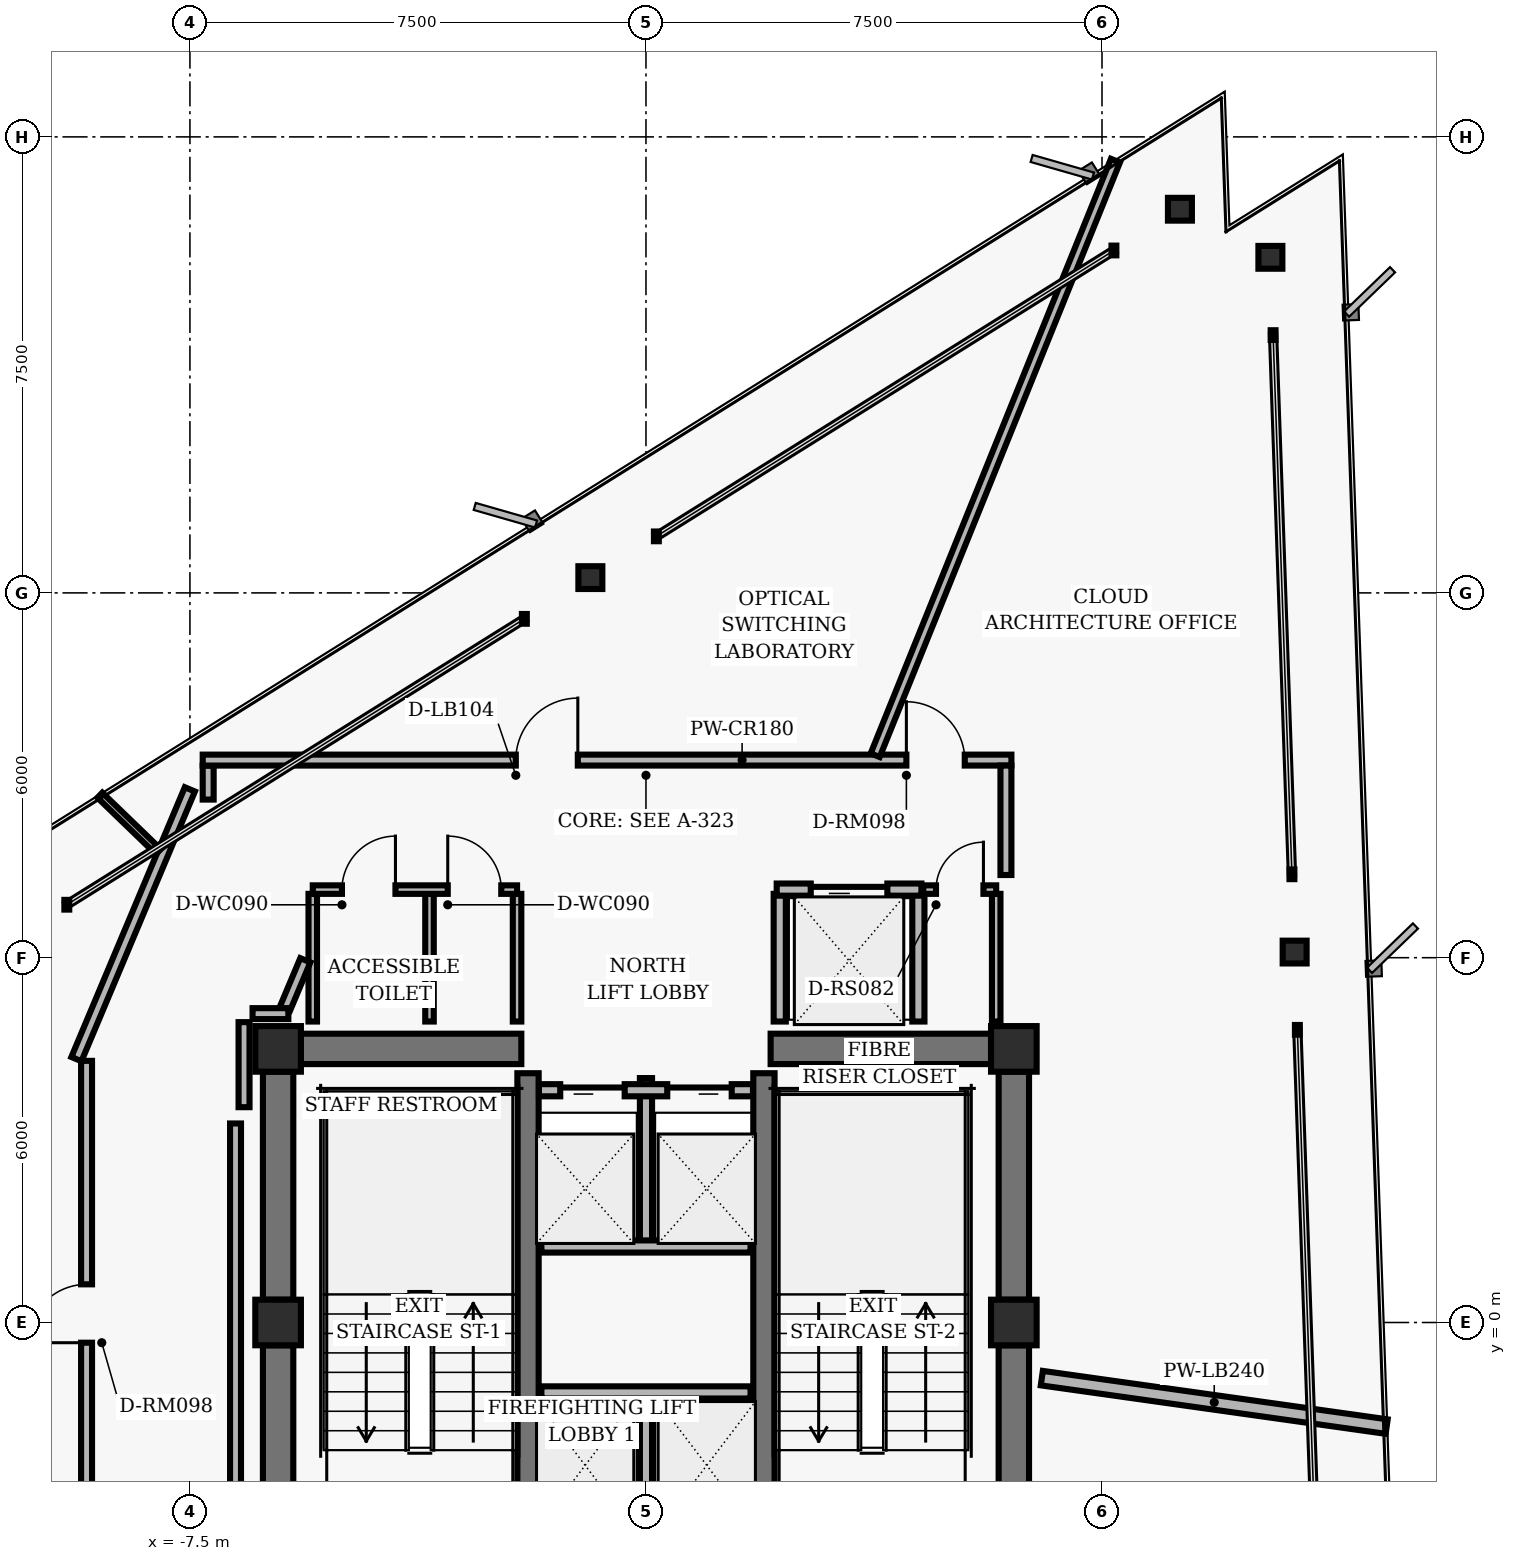
"""IFC4 building model, lengths in metres.
Left out: names, types, materials, properties, quantities, classifications, styles, units other than length and angle.
Written with IfcOpenShell. Run it as: python <this file> out.ifc"""

import sys

from ifc_helpers import new_model, si_unit, direction, frame, frame_2d, origin, origin_2d, place, context, subcontext, project, spatial, rectangle, hollow_rectangle, i_section, extrude, element, fill, save


model = new_model("IFC4")
c1 = context("Model", 3, precision=1e-05, world=origin(), true_north=direction((0.0, 1.0)))
c2 = subcontext(c1, "Body", "Model", "MODEL_VIEW")
j1 = project(units=[si_unit("LENGTHUNIT", "METRE"), si_unit("PLANEANGLEUNIT", "RADIAN")], contexts=[c1])
p1 = place(None, origin())
s1 = spatial("IfcSite", under=j1, at=p1, CompositionType="ELEMENT")
p2 = place(p1, origin())
s2 = spatial("IfcBuilding", under=s1, at=p2, CompositionType="ELEMENT")
p3 = place(p2, frame((0.0, 0.0, 205.76)))
s3 = spatial("IfcBuildingStorey", under=s2, at=p3, CompositionType="ELEMENT", Elevation=205.76)
for number, where, z_axis, x_axis in (
    (1, (-6.05, 4.5, 0.0), (0.0, 0.0, 1.0), (1.0, 0.0, 0.0)),
    (2, (6.05, 4.5, 0.0), (0.0, 0.0, 1.0), (1.0, 0.0, 0.0)),
    (3, (-6.05, 0.0, 0.0), (0.0, 0.0, 1.0), (1.0, 0.0, 0.0)),
    (4, (6.05, 0.0, 0.0), (0.0, 0.0, 1.0), (1.0, 0.0, 0.0)),
):
    element("IfcColumn", number, at=place(p3, frame(where, z_axis=z_axis, x_axis=x_axis)), inside=s3, PredefinedType="COLUMN", context=c2, shape_type="SweptSolid", body=[
        extrude(hollow_rectangle(XDim=0.75, YDim=0.75, WallThickness=0.05, InnerFilletRadius=0.02, OuterFilletRadius=0.04, at=origin_2d()), origin(), (0.0, 0.0, 1.0), 3.04),
    ])
p4 = place(p3, frame((-6.05, 0.375, 0.0), z_axis=(0.0, 0.0, 1.0), x_axis=(0.0, 1.0, 0.0)))
e5 = element("IfcWall", 5, at=p4, inside=s3, PredefinedType="SHEAR", context=c2, shape_type="SweptSolid", body=[
    extrude(rectangle(XDim=3.75, YDim=0.5, at=frame_2d((1.875, 0.0))), origin(), (0.0, 0.0, 1.0), 2.798),
])
p5 = place(p3, frame((-6.05, -3.925, 0.0), z_axis=(0.0, 0.0, 1.0), x_axis=(0.0, 1.0, 0.0)))
e6 = element("IfcWall", 6, at=p5, inside=s3, PredefinedType="SHEAR", context=c2, shape_type="SweptSolid", body=[
    extrude(rectangle(XDim=3.55, YDim=0.5, at=frame_2d((1.775, 0.0))), origin(), (0.0, 0.0, 1.0), 2.798),
])
p6 = place(p3, frame((6.05, 0.375, 0.0), z_axis=(0.0, 0.0, 1.0), x_axis=(0.0, 1.0, 0.0)))
e7 = element("IfcWall", 7, at=p6, inside=s3, PredefinedType="SHEAR", context=c2, shape_type="SweptSolid", body=[
    extrude(rectangle(XDim=3.75, YDim=0.5, at=frame_2d((1.875, 0.0))), origin(), (0.0, 0.0, 1.0), 2.798),
])
p7 = place(p3, frame((6.05, -3.925, 0.0), z_axis=(0.0, 0.0, 1.0), x_axis=(0.0, 1.0, 0.0)))
e8 = element("IfcWall", 8, at=p7, inside=s3, PredefinedType="SHEAR", context=c2, shape_type="SweptSolid", body=[
    extrude(rectangle(XDim=3.55, YDim=0.5, at=frame_2d((1.775, 0.0))), origin(), (0.0, 0.0, 1.0), 2.798),
])
for number, where, z_axis, x_axis in (
    (9, (-1.94, -4.1, 0.0), (0.0, 0.0, 1.0), (0.0, 1.0, 0.0)),
    (10, (1.94, -4.1, 0.0), (0.0, 0.0, 1.0), (0.0, 1.0, 0.0)),
):
    element("IfcWall", number, at=place(p3, frame(where, z_axis=z_axis, x_axis=x_axis)), inside=s3, PredefinedType="SHEAR", context=c2, shape_type="SweptSolid", body=[
        extrude(rectangle(XDim=8.2, YDim=0.35, at=frame_2d((4.1, 0.0))), origin(), (0.0, 0.0, 1.0), 2.798),
    ])
for number, where, z_axis, x_axis in (
    (11, (-5.675, 4.5, 0.0), (0.0, 0.0, 1.0), (1.0, 0.0, 0.0)),
    (12, (2.05, 4.5, 0.0), (0.0, 0.0, 1.0), (1.0, 0.0, 0.0)),
):
    element("IfcWall", number, at=place(p3, frame(where, z_axis=z_axis, x_axis=x_axis)), inside=s3, PredefinedType="SHEAR", context=c2, shape_type="SweptSolid", body=[
        extrude(rectangle(XDim=3.625, YDim=0.5, at=frame_2d((1.812, 0.0))), origin(), (0.0, 0.0, 1.0), 2.798),
    ])
for number, where, z_axis, x_axis in (
    (13, (10.668, 6.093, 0.0), (0.0, 0.0, 1.0), (1.0, 0.0, 0.0)),
    (14, (10.269, 17.519, 0.0), (0.0, 0.0, 1.0), (1.0, 0.0, 0.0)),
    (15, (8.781, 18.31, 0.0), (0.0, 0.0, 1.0), (1.0, 0.0, 0.0)),
    (16, (-0.915, 12.251, 0.0), (0.0, 0.0, 1.0), (1.0, 0.0, 0.0)),
):
    element("IfcColumn", number, at=place(p3, frame(where, z_axis=z_axis, x_axis=x_axis)), inside=s3, PredefinedType="COLUMN", context=c2, shape_type="SweptSolid", body=[
        extrude(i_section(OverallWidth=0.394, OverallDepth=0.375, WebThickness=0.017, FlangeThickness=0.028, FilletRadius=0.016, at=origin_2d()), origin(), (0.0, 0.0, 1.0), 3.04),
    ])
p8 = place(p3, frame((0.0, -3.82, 0.0), z_axis=(0.0, 0.0, 1.0), x_axis=(0.0, 1.0, 0.0)))
e17 = element("IfcWall", 17, at=p8, inside=s3, PredefinedType="PARTITIONING", context=c2, shape_type="SweptSolid", body=[
    extrude(rectangle(XDim=2.67, YDim=0.2, at=frame_2d((1.335, 0.0))), origin(), (0.0, 0.0, 1.0), 2.773),
])
p9 = place(p3, frame((-1.72, -1.15, 0.0), z_axis=(0.0, 0.0, 1.0), x_axis=(1.0, 0.0, 0.0)))
e18 = element("IfcWall", 18, at=p9, inside=s3, PredefinedType="PARTITIONING", context=c2, shape_type="SweptSolid", body=[
    extrude(rectangle(XDim=3.44, YDim=0.2, at=frame_2d((1.72, 0.0))), origin(), (0.0, 0.0, 1.0), 2.773),
])
p10 = place(p3, frame((0.0, 1.25, 0.0), z_axis=(0.0, 0.0, 1.0), x_axis=(0.0, 1.0, 0.0)))
e19 = element("IfcWall", 19, at=p10, inside=s3, PredefinedType="PARTITIONING", context=c2, shape_type="SweptSolid", body=[
    extrude(rectangle(XDim=2.77, YDim=0.2, at=frame_2d((1.385, 0.0))), origin(), (0.0, 0.0, 1.0), 2.773),
])
p11 = place(p3, frame((-1.72, 1.25, 0.0), z_axis=(0.0, 0.0, 1.0), x_axis=(1.0, 0.0, 0.0)))
e20 = element("IfcWall", 20, at=p11, inside=s3, PredefinedType="PARTITIONING", context=c2, shape_type="SweptSolid", body=[
    extrude(rectangle(XDim=3.44, YDim=0.2, at=frame_2d((1.72, 0.0))), origin(), (0.0, 0.0, 1.0), 2.773),
])
p12 = place(p3, frame((-1.76, 3.82, 0.0), z_axis=(0.0, 0.0, 1.0), x_axis=(1.0, 0.0, 0.0)))
e21 = element("IfcWall", 21, at=p12, inside=s3, PredefinedType="PARTITIONING", context=c2, shape_type="SweptSolid", body=[
    extrude(rectangle(XDim=3.52, YDim=0.2, at=frame_2d((1.76, 0.0))), origin(), (0.0, 0.0, 1.0), 2.773),
])
p13 = place(p12, frame((0.35, 0.0, 0.0)))
e22 = element("IfcOpeningElement", 22, at=p13, cuts=e21, PredefinedType="OPENING", context=c2, shape_type="SweptSolid", body=[
    extrude(rectangle(XDim=1.06, YDim=2.04, at=frame_2d((0.53, 1.02))), frame((0.0, 0.11, 0.0), z_axis=(0.0, -1.0, 0.0), x_axis=(1.0, 0.0, 0.0)), (0.0, 0.0, 1.0), 0.22),
])
p14 = place(p12, frame((2.11, 0.0, 0.0)))
e23 = element("IfcOpeningElement", 23, at=p14, cuts=e21, PredefinedType="OPENING", context=c2, shape_type="SweptSolid", body=[
    extrude(rectangle(XDim=1.06, YDim=2.04, at=frame_2d((0.53, 1.02))), frame((0.0, 0.11, 0.0), z_axis=(0.0, -1.0, 0.0), x_axis=(1.0, 0.0, 0.0)), (0.0, 0.0, 1.0), 0.22),
])
for number, where, z_axis, x_axis in (
    (24, (2.2, 4.95, 0.0), (0.0, 0.0, 1.0), (0.0, 1.0, 0.0)),
    (25, (4.48, 4.95, 0.0), (0.0, 0.0, 1.0), (0.0, 1.0, 0.0)),
):
    element("IfcWall", number, at=place(p3, frame(where, z_axis=z_axis, x_axis=x_axis)), inside=s3, PredefinedType="PARTITIONING", context=c2, shape_type="SweptSolid", body=[
        extrude(rectangle(XDim=2.1, YDim=0.2, at=frame_2d((1.05, 0.0))), origin(), (0.0, 0.0, 1.0), 2.773),
    ])
p15 = place(p3, frame((2.15, 7.12, 0.0), z_axis=(0.0, 0.0, 1.0), x_axis=(1.0, 0.0, 0.0)))
e26 = element("IfcWall", 26, at=p15, inside=s3, PredefinedType="PARTITIONING", context=c2, shape_type="SweptSolid", body=[
    extrude(rectangle(XDim=2.38, YDim=0.2, at=frame_2d((1.19, 0.0))), origin(), (0.0, 0.0, 1.0), 2.773),
])
p16 = place(p15, frame((0.56, 0.0, 0.0)))
e27 = element("IfcOpeningElement", 27, at=p16, cuts=e26, PredefinedType="OPENING", context=c2, shape_type="SweptSolid", body=[
    extrude(rectangle(XDim=1.26, YDim=2.06, at=frame_2d((0.63, 1.03))), frame((0.0, 0.11, 0.0), z_axis=(0.0, -1.0, 0.0), x_axis=(1.0, 0.0, 0.0)), (0.0, 0.0, 1.0), 0.22),
])
for number, where, z_axis, x_axis in (
    (28, (-5.48, 4.95, 0.0), (0.0, 0.0, 1.0), (0.0, 1.0, 0.0)),
    (29, (-3.56, 4.95, 0.0), (0.0, 0.0, 1.0), (0.0, 1.0, 0.0)),
    (30, (-2.12, 4.95, 0.0), (0.0, 0.0, 1.0), (0.0, 1.0, 0.0)),
):
    element("IfcWall", number, at=place(p3, frame(where, z_axis=z_axis, x_axis=x_axis)), inside=s3, PredefinedType="PARTITIONING", context=c2, shape_type="SweptSolid", body=[
        extrude(rectangle(XDim=2.1, YDim=0.14, at=frame_2d((1.05, 0.0))), origin(), (0.0, 0.0, 1.0), 2.773),
    ])
p17 = place(p3, frame((-5.48, 7.12, 0.0), z_axis=(0.0, 0.0, 1.0), x_axis=(1.0, 0.0, 0.0)))
e31 = element("IfcWall", 31, at=p17, inside=s3, PredefinedType="PARTITIONING", context=c2, shape_type="SweptSolid", body=[
    extrude(rectangle(XDim=3.36, YDim=0.14, at=frame_2d((1.68, 0.0))), origin(), (0.0, 0.0, 1.0), 2.773),
])
p18 = place(p17, frame((0.48, 0.0, 0.0)))
e32 = element("IfcOpeningElement", 32, at=p18, cuts=e31, PredefinedType="OPENING", context=c2, shape_type="SweptSolid", body=[
    extrude(rectangle(XDim=0.88, YDim=2.02, at=frame_2d((0.44, 1.01))), frame((0.0, 0.08, 0.0), z_axis=(0.0, -1.0, 0.0), x_axis=(1.0, 0.0, 0.0)), (0.0, 0.0, 1.0), 0.16),
])
p19 = place(p17, frame((2.22, 0.0, 0.0)))
e33 = element("IfcOpeningElement", 33, at=p19, cuts=e31, PredefinedType="OPENING", context=c2, shape_type="SweptSolid", body=[
    extrude(rectangle(XDim=0.88, YDim=2.02, at=frame_2d((0.44, 1.01))), frame((0.0, 0.08, 0.0), z_axis=(0.0, -1.0, 0.0), x_axis=(1.0, 0.0, 0.0)), (0.0, 0.0, 1.0), 0.16),
])
p20 = place(p3, frame((5.76, 4.95, 0.0), z_axis=(0.0, 0.0, 1.0), x_axis=(0.0, 1.0, 0.0)))
e34 = element("IfcWall", 34, at=p20, inside=s3, PredefinedType="PARTITIONING", context=c2, shape_type="SweptSolid", body=[
    extrude(rectangle(XDim=2.1, YDim=0.14, at=frame_2d((1.05, 0.0))), origin(), (0.0, 0.0, 1.0), 2.253),
])
p21 = place(p3, frame((4.56, 7.12, 0.0), z_axis=(0.0, 0.0, 1.0), x_axis=(1.0, 0.0, 0.0)))
e35 = element("IfcWall", 35, at=p21, inside=s3, PredefinedType="PARTITIONING", context=c2, shape_type="SweptSolid", body=[
    extrude(rectangle(XDim=1.2, YDim=0.14, at=frame_2d((0.6, 0.0))), origin(), (0.0, 0.0, 1.0), 2.773),
])
p22 = place(p21, frame((0.21, 0.0, 0.0)))
e36 = element("IfcOpeningElement", 36, at=p22, cuts=e35, PredefinedType="OPENING", context=c2, shape_type="SweptSolid", body=[
    extrude(rectangle(XDim=0.78, YDim=2.01, at=frame_2d((0.39, 1.005))), frame((0.0, 0.08, 0.0), z_axis=(0.0, -1.0, 0.0), x_axis=(1.0, 0.0, 0.0)), (0.0, 0.0, 1.0), 0.16),
])
p23 = place(p3, frame((-9.2, -4.303, 0.0), z_axis=(0.0, 0.0, 1.0), x_axis=(0.0, 1.0, 0.0)))
e37 = element("IfcWall", 37, at=p23, inside=s3, PredefinedType="PARTITIONING", context=c2, shape_type="SweptSolid", body=[
    extrude(rectangle(XDim=8.607, YDim=0.18, at=frame_2d((4.303, 0.0))), origin(), (0.0, 0.0, 1.0), 2.773),
])
p24 = place(p23, frame((3.971, 0.0, 0.0)))
e38 = element("IfcOpeningElement", 38, at=p24, cuts=e37, PredefinedType="OPENING", context=c2, shape_type="SweptSolid", body=[
    extrude(rectangle(XDim=0.96, YDim=2.02, at=frame_2d((0.48, 1.01))), frame((0.0, 0.1, 0.0), z_axis=(0.0, -1.0, 0.0), x_axis=(1.0, 0.0, 0.0)), (0.0, 0.0, 1.0), 0.2),
])
p25 = place(p3, frame((-9.367, 4.332, 0.0), z_axis=(0.0, 0.0, 1.0), x_axis=(0.387573945081, 0.921838617706, 0.0)))
e39 = element("IfcWall", 39, at=p25, inside=s3, PredefinedType="PARTITIONING", context=c2, shape_type="SweptSolid", body=[
    extrude(rectangle(XDim=4.813, YDim=0.18, at=frame_2d((2.407, 0.0))), origin(), (0.0, 0.0, 1.0), 2.773),
])
p26 = place(p3, frame((-7.2, 8.601, 0.0), z_axis=(0.0, 0.0, 1.0), x_axis=(0.0, 1.0, 0.0)))
e40 = element("IfcWall", 40, at=p26, inside=s3, PredefinedType="PARTITIONING", context=c2, shape_type="SweptSolid", body=[
    extrude(rectangle(XDim=0.559, YDim=0.18, at=frame_2d((0.28, 0.0))), origin(), (0.0, 0.0, 1.0), 2.773),
])
p27 = place(p3, frame((-7.29, 9.25, 0.0), z_axis=(0.0, 0.0, 1.0), x_axis=(1.0, 0.0, 0.0)))
e41 = element("IfcWall", 41, at=p27, inside=s3, PredefinedType="PARTITIONING", context=c2, shape_type="SweptSolid", body=[
    extrude(rectangle(XDim=13.3, YDim=0.18, at=frame_2d((6.65, 0.0))), origin(), (0.0, 0.0, 1.0), 2.773),
])
p28 = place(p27, frame((11.573, 0.0, 0.0)))
e42 = element("IfcOpeningElement", 42, at=p28, cuts=e41, PredefinedType="OPENING", context=c2, shape_type="SweptSolid", body=[
    extrude(rectangle(XDim=0.96, YDim=2.02, at=frame_2d((0.48, 1.01))), frame((0.0, 0.1, 0.0), z_axis=(0.0, -1.0, 0.0), x_axis=(1.0, 0.0, 0.0)), (0.0, 0.0, 1.0), 0.2),
])
p29 = place(p27, frame((5.149, 0.0, 0.0)))
e43 = element("IfcOpeningElement", 43, at=p29, cuts=e41, PredefinedType="OPENING", context=c2, shape_type="SweptSolid", body=[
    extrude(rectangle(XDim=1.02, YDim=2.02, at=frame_2d((0.51, 1.01))), frame((0.0, 0.1, 0.0), z_axis=(0.0, -1.0, 0.0), x_axis=(1.0, 0.0, 0.0)), (0.0, 0.0, 1.0), 0.2),
])
p30 = place(p3, frame((5.92, 9.16, 0.0), z_axis=(0.0, 0.0, 1.0), x_axis=(0.0, -1.0, 0.0)))
e44 = element("IfcWall", 44, at=p30, inside=s3, PredefinedType="PARTITIONING", context=c2, shape_type="SweptSolid", body=[
    extrude(rectangle(XDim=1.8, YDim=0.18, at=frame_2d((0.9, 0.0))), origin(), (0.0, 0.0, 1.0), 2.773),
])
p31 = place(p3, frame((-5.602, 5.958, 0.0), z_axis=(0.0, 0.0, 1.0), x_axis=(-0.387588639363, -0.921832439566, 0.0)))
e45 = element("IfcWall", 45, at=p31, inside=s3, PredefinedType="PARTITIONING", context=c2, shape_type="SweptSolid", body=[
    extrude(rectangle(XDim=0.862, YDim=0.18, at=frame_2d((0.431, 0.0))), origin(), (0.0, 0.0, 1.0), 2.773),
])
p32 = place(p3, frame((-5.881, 5.08, 0.0), z_axis=(0.0, 0.0, 1.0), x_axis=(-1.0, 0.0, 0.0)))
e46 = element("IfcWall", 46, at=p32, inside=s3, PredefinedType="PARTITIONING", context=c2, shape_type="SweptSolid", body=[
    extrude(rectangle(XDim=0.589, YDim=0.18, at=frame_2d((0.294, 0.0))), origin(), (0.0, 0.0, 1.0), 2.773),
])
p33 = place(p3, frame((-6.61, 4.94, 0.0), z_axis=(0.0, 0.0, 1.0), x_axis=(0.0, -1.0, 0.0)))
e47 = element("IfcWall", 47, at=p33, inside=s3, PredefinedType="PARTITIONING", context=c2, shape_type="SweptSolid", body=[
    extrude(rectangle(XDim=1.399, YDim=0.18, at=frame_2d((0.699, 0.0))), origin(), (0.0, 0.0, 1.0), 2.773),
])
p34 = place(p3, frame((-6.75, 3.273, 0.0), z_axis=(0.0, 0.0, 1.0), x_axis=(0.0, -1.0, 0.0)))
e48 = element("IfcWall", 48, at=p34, inside=s3, PredefinedType="PARTITIONING", context=c2, shape_type="SweptSolid", body=[
    extrude(rectangle(XDim=6.547, YDim=0.18, at=frame_2d((3.273, 0.0))), origin(), (0.0, 0.0, 1.0), 2.773),
])
p35 = place(p3, frame((6.51, -0.915, 0.0), z_axis=(0.0, 0.0, 1.0), x_axis=(0.990267505523, -0.139177108413, 0.0)))
e49 = element("IfcWall", 49, at=p35, inside=s3, PredefinedType="PARTITIONING", context=c2, shape_type="SweptSolid", body=[
    extrude(rectangle(XDim=5.727, YDim=0.24, at=frame_2d((2.864, 0.0))), origin(), (0.0, 0.0, 1.0), 2.773),
])
p36 = place(p3, frame((3.77, 9.33, 0.0), z_axis=(0.0, 0.0, 1.0), x_axis=(0.374613070454, 0.927181237647, 0.0)))
e50 = element("IfcWall", 50, at=p36, inside=s3, PredefinedType="PARTITIONING", context=c2, shape_type="SweptSolid", body=[
    extrude(rectangle(XDim=10.547, YDim=0.16, at=frame_2d((5.274, 0.0))), origin(), (0.0, 0.0, 1.0), 2.773),
])
p37 = place(p3, frame((-8.019, 7.744, 0.0), z_axis=(0.0, 0.0, 1.0), x_axis=(-0.719319685721, 0.694679199151, 0.0)))
e51 = element("IfcWall", 51, at=p37, inside=s3, PredefinedType="MOVABLE", context=c2, shape_type="SweptSolid", body=[
    extrude(rectangle(XDim=1.338, YDim=0.115, at=frame_2d((0.669, 0.0))), origin(), (0.0, 0.0, 1.0), 2.773),
])
p38 = place(p13, origin())
e52 = element("IfcDoor", 52, at=p38, inside=s3, OperationType="SLIDING_TO_LEFT", PredefinedType="DOOR", context=c2, shape_type="SweptSolid", body=[
    extrude(rectangle(XDim=1.06, YDim=2.04, at=frame_2d((0.53, 1.02))), frame((0.0, 0.025, 0.0), z_axis=(0.0, -1.0, 0.0), x_axis=(1.0, 0.0, 0.0)), (0.0, 0.0, 1.0), 0.05),
])
fill(e22, e52)
p39 = place(p14, origin())
e53 = element("IfcDoor", 53, at=p39, inside=s3, OperationType="SLIDING_TO_RIGHT", PredefinedType="DOOR", context=c2, shape_type="SweptSolid", body=[
    extrude(rectangle(XDim=1.06, YDim=2.04, at=frame_2d((0.53, 1.02))), frame((0.0, 0.025, 0.0), z_axis=(0.0, -1.0, 0.0), x_axis=(1.0, 0.0, 0.0)), (0.0, 0.0, 1.0), 0.05),
])
fill(e23, e53)
p40 = place(p16, origin())
e54 = element("IfcDoor", 54, at=p40, inside=s3, OperationType="SLIDING_TO_LEFT", PredefinedType="DOOR", context=c2, shape_type="SweptSolid", body=[
    extrude(rectangle(XDim=1.26, YDim=2.06, at=frame_2d((0.63, 1.03))), frame((0.0, 0.025, 0.0), z_axis=(0.0, -1.0, 0.0), x_axis=(1.0, 0.0, 0.0)), (0.0, 0.0, 1.0), 0.05),
])
fill(e27, e54)
p41 = place(p18, origin())
e55 = element("IfcDoor", 55, at=p41, inside=s3, OperationType="SINGLE_SWING_RIGHT", PredefinedType="DOOR", context=c2, shape_type="SweptSolid", body=[
    extrude(rectangle(XDim=0.88, YDim=2.02, at=frame_2d((0.44, 1.01))), frame((0.0, 0.025, 0.0), z_axis=(0.0, -1.0, 0.0), x_axis=(1.0, 0.0, 0.0)), (0.0, 0.0, 1.0), 0.05),
])
fill(e32, e55)
p42 = place(p19, origin())
e56 = element("IfcDoor", 56, at=p42, inside=s3, OperationType="SINGLE_SWING_LEFT", PredefinedType="DOOR", context=c2, shape_type="SweptSolid", body=[
    extrude(rectangle(XDim=0.88, YDim=2.02, at=frame_2d((0.44, 1.01))), frame((0.0, 0.025, 0.0), z_axis=(0.0, -1.0, 0.0), x_axis=(1.0, 0.0, 0.0)), (0.0, 0.0, 1.0), 0.05),
])
fill(e33, e56)
p43 = place(p22, origin())
e57 = element("IfcDoor", 57, at=p43, inside=s3, OperationType="SINGLE_SWING_RIGHT", PredefinedType="DOOR", context=c2, shape_type="SweptSolid", body=[
    extrude(rectangle(XDim=0.78, YDim=2.01, at=frame_2d((0.39, 1.005))), frame((0.0, 0.025, 0.0), z_axis=(0.0, -1.0, 0.0), x_axis=(1.0, 0.0, 0.0)), (0.0, 0.0, 1.0), 0.05),
])
fill(e36, e57)
p44 = place(p28, origin())
e58 = element("IfcDoor", 58, at=p44, inside=s3, OperationType="SINGLE_SWING_LEFT", PredefinedType="DOOR", context=c2, shape_type="SweptSolid", body=[
    extrude(rectangle(XDim=0.96, YDim=2.02, at=frame_2d((0.48, 1.01))), frame((0.0, 0.025, 0.0), z_axis=(0.0, -1.0, 0.0), x_axis=(1.0, 0.0, 0.0)), (0.0, 0.0, 1.0), 0.05),
])
fill(e42, e58)
p45 = place(p29, origin())
e59 = element("IfcDoor", 59, at=p45, inside=s3, OperationType="SINGLE_SWING_RIGHT", PredefinedType="DOOR", context=c2, shape_type="SweptSolid", body=[
    extrude(rectangle(XDim=1.02, YDim=2.02, at=frame_2d((0.51, 1.01))), frame((0.0, 0.025, 0.0), z_axis=(0.0, -1.0, 0.0), x_axis=(1.0, 0.0, 0.0)), (0.0, 0.0, 1.0), 0.05),
])
fill(e43, e59)
p46 = place(p24, origin())
e60 = element("IfcDoor", 60, at=p46, inside=s3, OperationType="SINGLE_SWING_LEFT", PredefinedType="DOOR", context=c2, shape_type="SweptSolid", body=[
    extrude(rectangle(XDim=0.96, YDim=2.02, at=frame_2d((0.48, 1.01))), frame((0.0, 0.025, 0.0), z_axis=(0.0, -1.0, 0.0), x_axis=(1.0, 0.0, 0.0)), (0.0, 0.0, 1.0), 0.05),
])
fill(e38, e60)
save(model, sys.argv[1])
